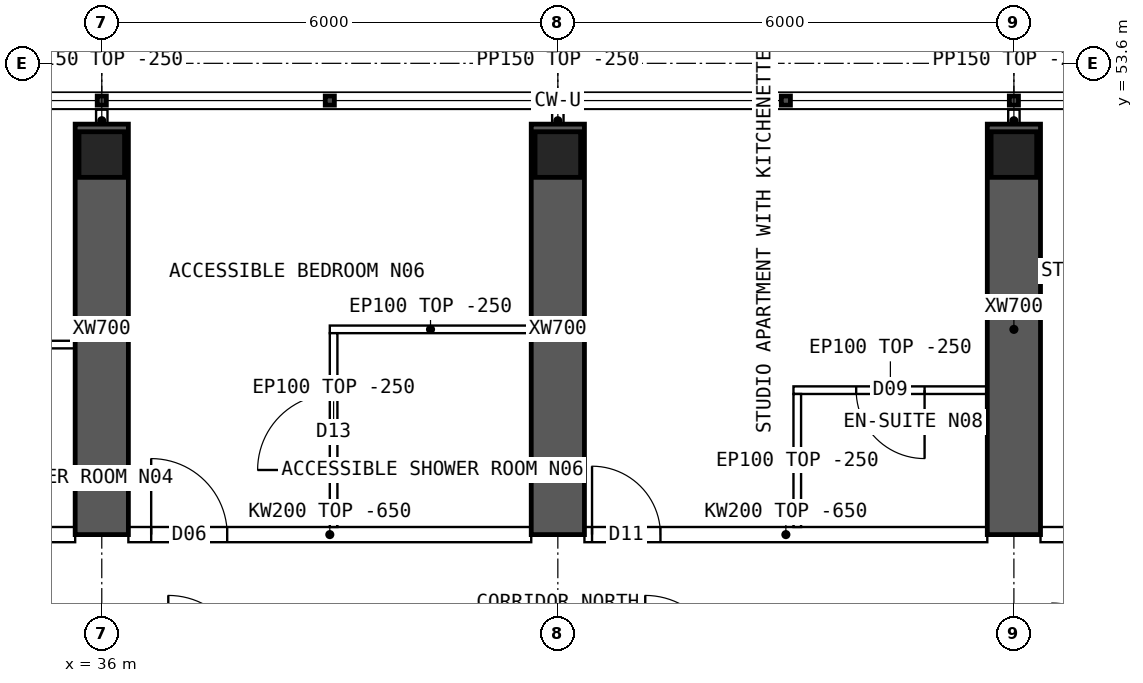
"""IFC4 building model, lengths in metres.
Left out: names, types, materials, properties, quantities, classifications, styles, units other than length and angle.
Written with IfcOpenShell. Run it as: python <this file> out.ifc"""

import sys

from ifc_helpers import new_model, si_unit, direction, frame, frame_2d, origin, origin_2d, place, context, subcontext, project, spatial, polyline, rectangle, hollow_rectangle, outline, extrude, element, fill, save


model = new_model("IFC4")
c1 = context("Model", 3, precision=1e-05, world=origin(), true_north=direction((0.0, 1.0)))
c2 = subcontext(c1, "Body", "Model", "MODEL_VIEW")
j1 = project(units=[si_unit("LENGTHUNIT", "METRE"), si_unit("PLANEANGLEUNIT", "RADIAN")], contexts=[c1])
p1 = place(None, origin())
s1 = spatial("IfcSite", under=j1, at=p1, CompositionType="ELEMENT")
p2 = place(p1, origin())
s2 = spatial("IfcBuilding", under=s1, at=p2, CompositionType="ELEMENT")
p3 = place(p2, frame((0.0, 0.0, 246.55)))
s3 = spatial("IfcBuildingStorey", under=s2, at=p3, CompositionType="ELEMENT", Elevation=246.55)
for number, where, z_axis, x_axis in (
    (1, (36.0, 52.4, 0.0), (0.0, 0.0, 1.0), (1.0, 0.0, 0.0)),
    (2, (42.0, 52.4, 0.0), (0.0, 0.0, 1.0), (1.0, 0.0, 0.0)),
    (3, (48.0, 52.4, 0.0), (0.0, 0.0, 1.0), (1.0, 0.0, 0.0)),
):
    element("IfcColumn", number, at=place(p3, frame(where, z_axis=z_axis, x_axis=x_axis)), inside=s3, PredefinedType="COLUMN", context=c2, shape_type="SweptSolid", body=[
        extrude(hollow_rectangle(XDim=0.6, YDim=0.6, WallThickness=0.06, at=origin_2d()), origin(), (0.0, 0.0, 1.0), 3.75),
    ])
for number, where, z_axis, x_axis in (
    (4, (36.0, 47.4, 0.0), (0.0, 0.0, 1.0), (0.0, 1.0, 0.0)),
    (5, (42.0, 47.4, 0.0), (0.0, 0.0, 1.0), (0.0, 1.0, 0.0)),
    (6, (48.0, 47.4, 0.0), (0.0, 0.0, 1.0), (0.0, 1.0, 0.0)),
):
    element("IfcWall", number, at=place(p3, frame(where, z_axis=z_axis, x_axis=x_axis)), inside=s3, PredefinedType="SHEAR", context=c2, shape_type="SweptSolid", body=[
        extrude(rectangle(XDim=5.4, YDim=0.7, at=frame_2d((2.7, 0.0))), origin(), (0.0, 0.0, 1.0), 3.75),
    ])
p4 = place(p3, frame((30.35, 47.4, 0.0), z_axis=(0.0, 0.0, 1.0), x_axis=(1.0, 0.0, 0.0)))
e7 = element("IfcWall", 7, at=p4, inside=s3, PredefinedType="SOLIDWALL", context=c2, shape_type="SweptSolid", body=[
    extrude(outline(polyline([(0.0, 0.0), (5.3, 0.0), (5.3, 3.1), (0.0, 3.1), (0.0, 0.0)])), frame((0.0, 0.1, 0.0), z_axis=(0.0, -1.0, 0.0), x_axis=(1.0, 0.0, 0.0)), (0.0, 0.0, 1.0), 0.2),
])
p5 = place(p4, frame((2.3, 0.0, 0.0)))
e8 = element("IfcOpeningElement", 8, at=p5, cuts=e7, PredefinedType="OPENING", context=c2, shape_type="SweptSolid", body=[
    extrude(rectangle(XDim=0.9, YDim=2.1, at=frame_2d((0.45, 1.05))), frame((0.0, 0.11, 0.0), z_axis=(0.0, -1.0, 0.0), x_axis=(1.0, 0.0, 0.0)), (0.0, 0.0, 1.0), 0.22),
])
p6 = place(p3, frame((36.35, 47.4, 0.0), z_axis=(0.0, 0.0, 1.0), x_axis=(1.0, 0.0, 0.0)))
e9 = element("IfcWall", 9, at=p6, inside=s3, PredefinedType="SOLIDWALL", context=c2, shape_type="SweptSolid", body=[
    extrude(outline(polyline([(0.0, 0.0), (5.3, 0.0), (5.3, 3.1), (0.0, 3.1), (0.0, 0.0)])), frame((0.0, 0.1, 0.0), z_axis=(0.0, -1.0, 0.0), x_axis=(1.0, 0.0, 0.0)), (0.0, 0.0, 1.0), 0.2),
])
p7 = place(p6, frame((0.3, 0.0, 0.0)))
e10 = element("IfcOpeningElement", 10, at=p7, cuts=e9, PredefinedType="OPENING", context=c2, shape_type="SweptSolid", body=[
    extrude(rectangle(XDim=1.0, YDim=2.1, at=frame_2d((0.5, 1.05))), frame((0.0, 0.11, 0.0), z_axis=(0.0, -1.0, 0.0), x_axis=(1.0, 0.0, 0.0)), (0.0, 0.0, 1.0), 0.22),
])
p8 = place(p3, frame((42.35, 47.4, 0.0), z_axis=(0.0, 0.0, 1.0), x_axis=(1.0, 0.0, 0.0)))
e11 = element("IfcWall", 11, at=p8, inside=s3, PredefinedType="SOLIDWALL", context=c2, shape_type="SweptSolid", body=[
    extrude(outline(polyline([(0.0, 0.0), (5.3, 0.0), (5.3, 3.1), (0.0, 3.1), (0.0, 0.0)])), frame((0.0, 0.1, 0.0), z_axis=(0.0, -1.0, 0.0), x_axis=(1.0, 0.0, 0.0)), (0.0, 0.0, 1.0), 0.2),
])
p9 = place(p8, frame((0.1, 0.0, 0.0)))
e12 = element("IfcOpeningElement", 12, at=p9, cuts=e11, PredefinedType="OPENING", context=c2, shape_type="SweptSolid", body=[
    extrude(rectangle(XDim=0.9, YDim=2.1, at=frame_2d((0.45, 1.05))), frame((0.0, 0.11, 0.0), z_axis=(0.0, -1.0, 0.0), x_axis=(1.0, 0.0, 0.0)), (0.0, 0.0, 1.0), 0.22),
])
p10 = place(p3, frame((48.35, 47.4, 0.0), z_axis=(0.0, 0.0, 1.0), x_axis=(1.0, 0.0, 0.0)))
e13 = element("IfcWall", 13, at=p10, inside=s3, PredefinedType="SOLIDWALL", context=c2, shape_type="SweptSolid", body=[
    extrude(outline(polyline([(0.0, 0.0), (5.3, 0.0), (5.3, 3.1), (0.0, 3.1), (0.0, 0.0)])), frame((0.0, 0.1, 0.0), z_axis=(0.0, -1.0, 0.0), x_axis=(1.0, 0.0, 0.0)), (0.0, 0.0, 1.0), 0.2),
])
p11 = place(p10, frame((2.3, 0.0, 0.0)))
e14 = element("IfcOpeningElement", 14, at=p11, cuts=e13, PredefinedType="OPENING", context=c2, shape_type="SweptSolid", body=[
    extrude(rectangle(XDim=0.9, YDim=2.1, at=frame_2d((0.45, 1.05))), frame((0.0, 0.11, 0.0), z_axis=(0.0, -1.0, 0.0), x_axis=(1.0, 0.0, 0.0)), (0.0, 0.0, 1.0), 0.22),
])
p12 = place(p3, frame((32.5, 49.9, 0.0), z_axis=(0.0, 0.0, 1.0), x_axis=(1.0, 0.0, 0.0)))
e15 = element("IfcWall", 15, at=p12, inside=s3, PredefinedType="PARTITIONING", context=c2, shape_type="SweptSolid", body=[
    extrude(rectangle(XDim=3.15, YDim=0.1, at=frame_2d((1.575, 0.0))), origin(), (0.0, 0.0, 1.0), 3.5),
])
p13 = place(p12, frame((0.25, 0.0, 0.0)))
e16 = element("IfcOpeningElement", 16, at=p13, cuts=e15, PredefinedType="OPENING", context=c2, shape_type="SweptSolid", body=[
    extrude(rectangle(XDim=0.8, YDim=2.1, at=frame_2d((0.4, 1.05))), frame((0.0, 0.06, 0.0), z_axis=(0.0, -1.0, 0.0), x_axis=(1.0, 0.0, 0.0)), (0.0, 0.0, 1.0), 0.12),
])
p14 = place(p3, frame((39.0, 50.1, 0.0), z_axis=(0.0, 0.0, 1.0), x_axis=(1.0, 0.0, 0.0)))
e17 = element("IfcWall", 17, at=p14, inside=s3, PredefinedType="PARTITIONING", context=c2, shape_type="SweptSolid", body=[
    extrude(rectangle(XDim=2.65, YDim=0.1, at=frame_2d((1.325, 0.0))), origin(), (0.0, 0.0, 1.0), 3.5),
])
p15 = place(p3, frame((39.05, 50.05, 0.0), z_axis=(0.0, 0.0, 1.0), x_axis=(0.0, -1.0, 0.0)))
e18 = element("IfcWall", 18, at=p15, inside=s3, PredefinedType="PARTITIONING", context=c2, shape_type="SweptSolid", body=[
    extrude(outline(polyline([(0.0, 0.0), (2.55, 0.0), (2.55, 3.1), (2.502, 3.1), (2.5, 3.5), (0.0, 3.5), (0.0, 0.0)])), frame((0.0, 0.05, 0.0), z_axis=(0.0, -1.0, 0.0), x_axis=(1.0, 0.0, 0.0)), (0.0, 0.0, 1.0), 0.1),
])
p16 = place(p15, frame((0.8, 0.0, 0.0)))
e19 = element("IfcOpeningElement", 19, at=p16, cuts=e18, PredefinedType="OPENING", context=c2, shape_type="SweptSolid", body=[
    extrude(rectangle(XDim=1.0, YDim=2.1, at=frame_2d((0.5, 1.05))), frame((0.0, 0.06, 0.0), z_axis=(0.0, -1.0, 0.0), x_axis=(1.0, 0.0, 0.0)), (0.0, 0.0, 1.0), 0.12),
])
p17 = place(p3, frame((45.1, 49.3, 0.0), z_axis=(0.0, 0.0, 1.0), x_axis=(1.0, 0.0, 0.0)))
e20 = element("IfcWall", 20, at=p17, inside=s3, PredefinedType="PARTITIONING", context=c2, shape_type="SweptSolid", body=[
    extrude(rectangle(XDim=2.55, YDim=0.1, at=frame_2d((1.275, 0.0))), origin(), (0.0, 0.0, 1.0), 3.5),
])
p18 = place(p17, frame((0.825, 0.0, 0.0)))
e21 = element("IfcOpeningElement", 21, at=p18, cuts=e20, PredefinedType="OPENING", context=c2, shape_type="SweptSolid", body=[
    extrude(rectangle(XDim=0.9, YDim=2.1, at=frame_2d((0.45, 1.05))), frame((0.0, 0.06, 0.0), z_axis=(0.0, -1.0, 0.0), x_axis=(1.0, 0.0, 0.0)), (0.0, 0.0, 1.0), 0.12),
])
p19 = place(p3, frame((45.15, 49.25, 0.0), z_axis=(0.0, 0.0, 1.0), x_axis=(0.0, -1.0, 0.0)))
e22 = element("IfcWall", 22, at=p19, inside=s3, PredefinedType="PARTITIONING", context=c2, shape_type="SweptSolid", body=[
    extrude(outline(polyline([(0.0, 0.0), (1.75, 0.0), (1.75, 3.1), (1.702, 3.1), (1.7, 3.5), (0.0, 3.5), (0.0, 0.0)])), frame((0.0, 0.05, 0.0), z_axis=(0.0, -1.0, 0.0), x_axis=(1.0, 0.0, 0.0)), (0.0, 0.0, 1.0), 0.1),
])
for number, where, z_axis, x_axis in (
    (23, (36.0, 52.7, 0.0), (0.0, 0.0, 1.0), (0.0, 1.0, 0.0)),
    (24, (42.0, 52.7, 0.0), (0.0, 0.0, 1.0), (0.0, 1.0, 0.0)),
    (25, (48.0, 52.7, 0.0), (0.0, 0.0, 1.0), (0.0, 1.0, 0.0)),
):
    element("IfcWall", number, at=place(p3, frame(where, z_axis=z_axis, x_axis=x_axis)), inside=s3, PredefinedType="PARTITIONING", context=c2, shape_type="SweptSolid", body=[
        extrude(rectangle(XDim=0.29, YDim=0.15, at=frame_2d((0.145, 0.0))), origin(), (0.0, 0.0, 1.0), 3.5),
    ])
p20 = place(p16, origin())
e26 = element("IfcDoor", 26, at=p20, inside=s3, OperationType="SINGLE_SWING_RIGHT", PredefinedType="DOOR", context=c2, shape_type="SweptSolid", body=[
    extrude(rectangle(XDim=1.0, YDim=2.1, at=frame_2d((0.5, 1.05))), frame((0.0, 0.025, 0.0), z_axis=(0.0, -1.0, 0.0), x_axis=(1.0, 0.0, 0.0)), (0.0, 0.0, 1.0), 0.05),
])
fill(e19, e26)
p21 = place(p7, origin())
e27 = element("IfcDoor", 27, at=p21, inside=s3, OperationType="SINGLE_SWING_LEFT", PredefinedType="DOOR", context=c2, shape_type="SweptSolid", body=[
    extrude(rectangle(XDim=1.0, YDim=2.1, at=frame_2d((0.5, 1.05))), frame((0.0, 0.025, 0.0), z_axis=(0.0, -1.0, 0.0), x_axis=(1.0, 0.0, 0.0)), (0.0, 0.0, 1.0), 0.05),
])
fill(e10, e27)
p22 = place(p18, origin())
e28 = element("IfcDoor", 28, at=p22, inside=s3, OperationType="SINGLE_SWING_RIGHT", PredefinedType="DOOR", context=c2, shape_type="SweptSolid", body=[
    extrude(rectangle(XDim=0.9, YDim=2.1, at=frame_2d((0.45, 1.05))), frame((0.0, 0.025, 0.0), z_axis=(0.0, -1.0, 0.0), x_axis=(1.0, 0.0, 0.0)), (0.0, 0.0, 1.0), 0.05),
])
fill(e21, e28)
p23 = place(p9, origin())
e29 = element("IfcDoor", 29, at=p23, inside=s3, OperationType="SINGLE_SWING_LEFT", PredefinedType="DOOR", context=c2, shape_type="SweptSolid", body=[
    extrude(rectangle(XDim=0.9, YDim=2.1, at=frame_2d((0.45, 1.05))), frame((0.0, 0.025, 0.0), z_axis=(0.0, -1.0, 0.0), x_axis=(1.0, 0.0, 0.0)), (0.0, 0.0, 1.0), 0.05),
])
fill(e12, e29)
save(model, sys.argv[1])
